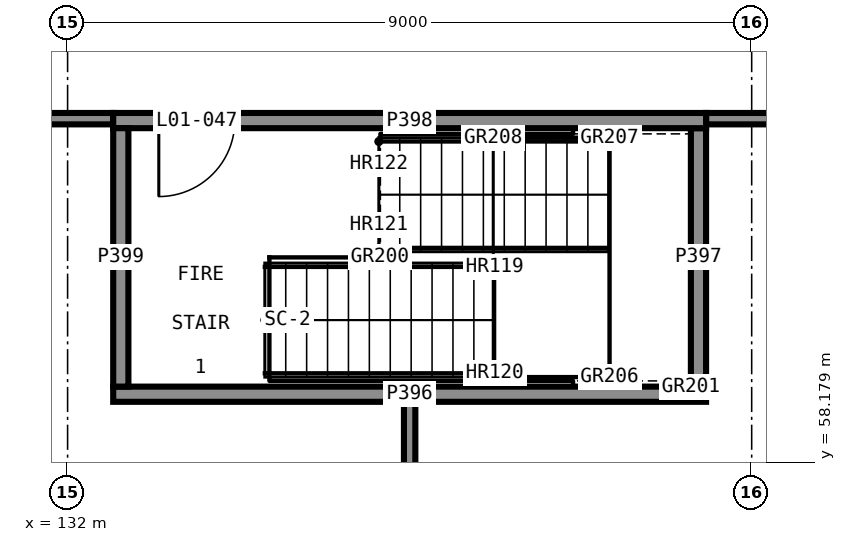
"""IFC4 building model, lengths in metres.
Left out: names, types, materials, properties, quantities, classifications, styles, units other than length and angle.
Written with IfcOpenShell. Run it as: python <this file> out.ifc"""

import sys

from ifc_helpers import new_model, si_unit, direction, frame, frame_2d, origin, place, context, subcontext, project, spatial, rectangle, extrude, element, fill, save


model = new_model("IFC4")
c1 = context("Model", 3, precision=1e-05, world=origin(), true_north=direction((0.0, 1.0)))
c2 = subcontext(c1, "Body", "Model", "MODEL_VIEW")
j1 = project(units=[si_unit("LENGTHUNIT", "METRE"), si_unit("PLANEANGLEUNIT", "RADIAN")], contexts=[c1])
p1 = place(None, origin())
s1 = spatial("IfcSite", under=j1, at=p1, CompositionType="ELEMENT")
p2 = place(p1, origin())
s2 = spatial("IfcBuilding", under=s1, at=p2, CompositionType="ELEMENT")
p3 = place(p2, frame((0.0, 0.0, 5.5)))
s3 = spatial("IfcBuildingStorey", under=s2, at=p3, CompositionType="ELEMENT", Elevation=5.5)
p4 = place(p3, frame((132.6, 59.075, 0.0), z_axis=(0.0, 0.0, 1.0), x_axis=(1.0, 0.0, 0.0)))
e1 = element("IfcWall", 1, at=p4, inside=s3, PredefinedType="SHEAR", context=c2, shape_type="SweptSolid", body=[
    extrude(rectangle(XDim=7.8, YDim=0.2, at=frame_2d((3.9, 0.0))), origin(), (0.0, 0.0, 1.0), 3.75),
])
p5 = place(p3, frame((140.3, 59.175, 0.0), z_axis=(0.0, 0.0, 1.0), x_axis=(0.0, 1.0, 0.0)))
e2 = element("IfcWall", 2, at=p5, inside=s3, PredefinedType="SHEAR", context=c2, shape_type="SweptSolid", body=[
    extrude(rectangle(XDim=3.4, YDim=0.2, at=frame_2d((1.7, 0.0))), origin(), (0.0, 0.0, 1.0), 3.75),
])
p6 = place(p3, frame((140.4, 62.675, 0.0), z_axis=(0.0, 0.0, 1.0), x_axis=(-1.0, 0.0, 0.0)))
e3 = element("IfcWall", 3, at=p6, inside=s3, PredefinedType="SHEAR", context=c2, shape_type="SweptSolid", body=[
    extrude(rectangle(XDim=7.8, YDim=0.2, at=frame_2d((3.9, 0.0))), origin(), (0.0, 0.0, 1.0), 3.75),
])
p7 = place(p6, frame((6.2, 0.0, 0.0)))
e4 = element("IfcOpeningElement", 4, at=p7, cuts=e3, PredefinedType="OPENING", context=c2, shape_type="SweptSolid", body=[
    extrude(rectangle(XDim=1.0, YDim=2.1, at=frame_2d((0.5, 1.05))), frame((0.0, 0.11, 0.0), z_axis=(0.0, -1.0, 0.0), x_axis=(1.0, 0.0, 0.0)), (0.0, 0.0, 1.0), 0.22),
])
p8 = place(p3, frame((132.7, 62.575, 0.0), z_axis=(0.0, 0.0, 1.0), x_axis=(0.0, -1.0, 0.0)))
e5 = element("IfcWall", 5, at=p8, inside=s3, PredefinedType="SHEAR", context=c2, shape_type="SweptSolid", body=[
    extrude(rectangle(XDim=3.4, YDim=0.2, at=frame_2d((1.7, 0.0))), origin(), (0.0, 0.0, 1.0), 3.75),
])
p9 = place(p3, frame((132.6, 62.7, 0.0), z_axis=(0.0, 0.0, 1.0), x_axis=(-1.0, 0.0, 0.0)))
e6 = element("IfcWall", 6, at=p9, inside=s3, PredefinedType="PARTITIONING", context=c2, shape_type="SweptSolid", body=[
    extrude(rectangle(XDim=11.825, YDim=0.15, at=frame_2d((5.913, 0.0))), origin(), (0.0, 0.0, 1.0), 3.75),
])
p10 = place(p9, frame((5.427, 0.0, 0.0)))
e7 = element("IfcOpeningElement", 7, at=p10, cuts=e6, PredefinedType="OPENING", context=c2, shape_type="SweptSolid", body=[
    extrude(rectangle(XDim=1.0, YDim=2.1, at=frame_2d((0.5, 1.05))), frame((0.0, 0.085, 0.0), z_axis=(0.0, -1.0, 0.0), x_axis=(1.0, 0.0, 0.0)), (0.0, 0.0, 1.0), 0.17),
])
p11 = place(p3, frame((143.225, 62.7, 0.0), z_axis=(0.0, 0.0, 1.0), x_axis=(-1.0, 0.0, 0.0)))
e8 = element("IfcWall", 8, at=p11, inside=s3, PredefinedType="PARTITIONING", context=c2, shape_type="SweptSolid", body=[
    extrude(rectangle(XDim=2.825, YDim=0.15, at=frame_2d((1.413, 0.0))), origin(), (0.0, 0.0, 1.0), 3.75),
])
p12 = place(p3, frame((136.5, 50.9, 0.0), z_axis=(0.0, 0.0, 1.0), x_axis=(0.0, 1.0, 0.0)))
e9 = element("IfcWall", 9, at=p12, inside=s3, PredefinedType="PARTITIONING", context=c2, shape_type="SweptSolid", body=[
    extrude(rectangle(XDim=8.075, YDim=0.15, at=frame_2d((4.038, 0.0))), origin(), (0.0, 0.0, 1.0), 3.75),
])
p13 = place(p7, origin())
e10 = element("IfcDoor", 10, at=p13, inside=s3, OperationType="SINGLE_SWING_LEFT", PredefinedType="DOOR", context=c2, shape_type="SweptSolid", body=[
    extrude(rectangle(XDim=1.0, YDim=2.1, at=frame_2d((0.5, 1.05))), frame((0.0, 0.025, 0.0), z_axis=(0.0, -1.0, 0.0), x_axis=(1.0, 0.0, 0.0)), (0.0, 0.0, 1.0), 0.05),
])
fill(e4, e10)
save(model, sys.argv[1])
